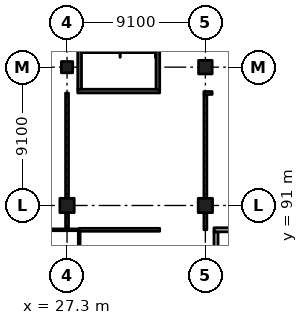
"""IFC4 building model, lengths in metres.
Left out: names, types, materials, properties, quantities, classifications, styles, units other than length and angle.
Written with IfcOpenShell. Run it as: python <this file> out.ifc"""

import sys

from ifc_helpers import new_model, si_unit, direction, frame, frame_2d, origin, origin_2d, place, context, subcontext, project, spatial, rectangle, extrude, element, fill, save


model = new_model("IFC4")
c1 = context("Model", 3, precision=1e-05, world=origin(), true_north=direction((0.0, 1.0)))
c2 = subcontext(c1, "Body", "Model", "MODEL_VIEW")
j1 = project(units=[si_unit("LENGTHUNIT", "METRE"), si_unit("PLANEANGLEUNIT", "RADIAN")], contexts=[c1])
p1 = place(None, origin())
s1 = spatial("IfcSite", under=j1, at=p1, CompositionType="ELEMENT")
p2 = place(p1, origin())
s2 = spatial("IfcBuilding", under=s1, at=p2, CompositionType="ELEMENT")
p3 = place(p2, origin())
s3 = spatial("IfcBuildingStorey", under=s2, at=p3, CompositionType="ELEMENT", Elevation=0.0)
p4 = place(p3, frame((27.3, 91.0, -0.4), z_axis=(0.0, 0.0, 1.0), x_axis=(1.0, 0.0, 0.0)))
e1 = element("IfcColumn", 1, at=p4, inside=s3, PredefinedType="COLUMN", context=c2, shape_type="SweptSolid", body=[
    extrude(rectangle(XDim=0.95, YDim=0.95, at=origin_2d()), origin(), (0.0, 0.0, 1.0), 6.77),
])
p5 = place(p3, frame((27.3, 100.1, -0.4), z_axis=(0.0, 0.0, 1.0), x_axis=(1.0, 0.0, 0.0)))
e2 = element("IfcColumn", 2, at=p5, inside=s3, PredefinedType="COLUMN", context=c2, shape_type="SweptSolid", body=[
    extrude(rectangle(XDim=0.75, YDim=0.75, at=origin_2d()), origin(), (0.0, 0.0, 1.0), 6.77),
])
p6 = place(p3, frame((36.4, 91.0, -0.4), z_axis=(0.0, 0.0, 1.0), x_axis=(1.0, 0.0, 0.0)))
e3 = element("IfcColumn", 3, at=p6, inside=s3, PredefinedType="COLUMN", context=c2, shape_type="SweptSolid", body=[
    extrude(rectangle(XDim=0.95, YDim=0.95, at=origin_2d()), origin(), (0.0, 0.0, 1.0), 6.77),
])
p7 = place(p3, frame((36.4, 100.1, -0.4), z_axis=(0.0, 0.0, 1.0), x_axis=(1.0, 0.0, 0.0)))
e4 = element("IfcColumn", 4, at=p7, inside=s3, PredefinedType="COLUMN", context=c2, shape_type="SweptSolid", body=[
    extrude(rectangle(XDim=0.9, YDim=0.9, at=origin_2d()), origin(), (0.0, 0.0, 1.0), 6.77),
])
p8 = place(p3, frame((33.4, 98.525, -0.4), z_axis=(0.0, 0.0, 1.0), x_axis=(-1.0, 0.0, 0.0)))
e5 = element("IfcWall", 5, at=p8, inside=s3, PredefinedType="SHEAR", context=c2, shape_type="SweptSolid", body=[
    extrude(rectangle(XDim=5.4, YDim=0.25, at=frame_2d((2.7, 0.0))), origin(), (0.0, 0.0, 1.0), 6.77),
])
p9 = place(p8, frame((1.5, 0.0, 0.4)))
e6 = element("IfcOpeningElement", 6, at=p9, cuts=e5, PredefinedType="OPENING", context=c2, shape_type="SweptSolid", body=[
    extrude(rectangle(XDim=2.4, YDim=2.1, at=frame_2d((1.2, 1.05))), frame((0.0, 0.135, 0.0), z_axis=(0.0, -1.0, 0.0), x_axis=(1.0, 0.0, 0.0)), (0.0, 0.0, 1.0), 0.27),
])
p10 = place(p3, frame((28.125, 108.25, -0.4), z_axis=(0.0, 0.0, 1.0), x_axis=(0.0, -1.0, 0.0)))
e7 = element("IfcWall", 7, at=p10, inside=s3, PredefinedType="SHEAR", context=c2, shape_type="SweptSolid", body=[
    extrude(rectangle(XDim=9.6, YDim=0.25, at=frame_2d((4.8, 0.0))), origin(), (0.0, 0.0, 1.0), 6.77),
])
p11 = place(p3, frame((33.275, 108.25, -0.4), z_axis=(0.0, 0.0, 1.0), x_axis=(0.0, -1.0, 0.0)))
e8 = element("IfcWall", 8, at=p11, inside=s3, PredefinedType="SHEAR", context=c2, shape_type="SweptSolid", body=[
    extrude(rectangle(XDim=9.6, YDim=0.25, at=frame_2d((4.8, 0.0))), origin(), (0.0, 0.0, 1.0), 6.77),
])
p12 = place(p11, frame((7.95, 0.0, 0.4)))
e9 = element("IfcOpeningElement", 9, at=p12, cuts=e8, PredefinedType="OPENING", context=c2, shape_type="SweptSolid", body=[
    extrude(rectangle(XDim=1.2, YDim=2.1, at=frame_2d((0.6, 1.05))), frame((0.0, 0.135, 0.0), z_axis=(0.0, -1.0, 0.0), x_axis=(1.0, 0.0, 0.0)), (0.0, 0.0, 1.0), 0.27),
])
p13 = place(p3, frame((24.3, 89.4, 0.0), z_axis=(0.0, 0.0, 1.0), x_axis=(1.0, 0.0, 0.0)))
e10 = element("IfcWall", 10, at=p13, inside=s3, PredefinedType="PARTITIONING", context=c2, shape_type="SweptSolid", body=[
    extrude(rectangle(XDim=3.8, YDim=0.125, at=frame_2d((1.9, 0.0))), origin(), (0.0, 0.0, 1.0), 6.02),
])
p14 = place(p13, frame((1.05, 0.0, 0.0)))
e11 = element("IfcOpeningElement", 11, at=p14, cuts=e10, PredefinedType="OPENING", context=c2, shape_type="SweptSolid", body=[
    extrude(rectangle(XDim=0.9, YDim=2.1, at=frame_2d((0.45, 1.05))), frame((0.0, 0.073, 0.0), z_axis=(0.0, -1.0, 0.0), x_axis=(1.0, 0.0, 0.0)), (0.0, 0.0, 1.0), 0.145),
])
p15 = place(p3, frame((27.3, 90.525, 0.0), z_axis=(0.0, 0.0, 1.0), x_axis=(0.0, -1.0, 0.0)))
e12 = element("IfcWall", 12, at=p15, inside=s3, PredefinedType="PARTITIONING", context=c2, shape_type="SweptSolid", body=[
    extrude(rectangle(XDim=1.062, YDim=0.2, at=frame_2d((0.531, 0.0))), origin(), (0.0, 0.0, 1.0), 5.32),
])
p16 = place(p3, frame((27.3, 98.4, 0.0), z_axis=(0.0, 0.0, 1.0), x_axis=(0.0, -1.0, 0.0)))
e13 = element("IfcWall", 13, at=p16, inside=s3, PredefinedType="PARTITIONING", context=c2, shape_type="SweptSolid", body=[
    extrude(rectangle(XDim=6.925, YDim=0.2, at=frame_2d((3.462, 0.0))), origin(), (0.0, 0.0, 1.0), 5.32),
])
p17 = place(p16, frame((0.85, 0.0, 0.0)))
e14 = element("IfcOpeningElement", 14, at=p17, cuts=e13, PredefinedType="OPENING", context=c2, shape_type="SweptSolid", body=[
    extrude(rectangle(XDim=1.8, YDim=2.4, at=frame_2d((0.9, 1.2))), frame((0.0, 0.11, 0.0), z_axis=(0.0, -1.0, 0.0), x_axis=(1.0, 0.0, 0.0)), (0.0, 0.0, 1.0), 0.22),
])
p18 = place(p16, frame((4.25, 0.0, 0.0)))
e15 = element("IfcOpeningElement", 15, at=p18, cuts=e13, PredefinedType="OPENING", context=c2, shape_type="SweptSolid", body=[
    extrude(rectangle(XDim=1.8, YDim=2.4, at=frame_2d((0.9, 1.2))), frame((0.0, 0.11, 0.0), z_axis=(0.0, -1.0, 0.0), x_axis=(1.0, 0.0, 0.0)), (0.0, 0.0, 1.0), 0.22),
])
p19 = place(p3, frame((28.1, 89.3, 0.0), z_axis=(0.0, 0.0, 1.0), x_axis=(0.0, -1.0, 0.0)))
e16 = element("IfcWall", 16, at=p19, inside=s3, PredefinedType="PARTITIONING", context=c2, shape_type="SweptSolid", body=[
    extrude(rectangle(XDim=2.87, YDim=0.125, at=frame_2d((1.435, 0.0))), origin(), (0.0, 0.0, 1.0), 6.02),
])
p20 = place(p3, frame((33.4, 89.4, 0.0), z_axis=(0.0, 0.0, 1.0), x_axis=(-1.0, 0.0, 0.0)))
e17 = element("IfcWall", 17, at=p20, inside=s3, PredefinedType="PARTITIONING", context=c2, shape_type="SweptSolid", body=[
    extrude(rectangle(XDim=5.3, YDim=0.2, at=frame_2d((2.65, 0.0))), origin(), (0.0, 0.0, 1.0), 6.02),
])
p21 = place(p20, frame((1.75, 0.0, 0.0)))
e18 = element("IfcOpeningElement", 18, at=p21, cuts=e17, PredefinedType="OPENING", context=c2, shape_type="SweptSolid", body=[
    extrude(rectangle(XDim=1.8, YDim=2.4, at=frame_2d((0.9, 1.2))), frame((0.0, 0.11, 0.0), z_axis=(0.0, -1.0, 0.0), x_axis=(1.0, 0.0, 0.0)), (0.0, 0.0, 1.0), 0.22),
])
p22 = place(p3, frame((36.4, 90.525, 0.0), z_axis=(0.0, 0.0, 1.0), x_axis=(0.0, -1.0, 0.0)))
e19 = element("IfcWall", 19, at=p22, inside=s3, PredefinedType="PARTITIONING", context=c2, shape_type="SweptSolid", body=[
    extrude(rectangle(XDim=1.125, YDim=0.2, at=frame_2d((0.562, 0.0))), origin(), (0.0, 0.0, 1.0), 5.32),
])
p23 = place(p3, frame((36.4, 98.3, 0.0), z_axis=(0.0, 0.0, 1.0), x_axis=(0.0, -1.0, 0.0)))
e20 = element("IfcWall", 20, at=p23, inside=s3, PredefinedType="PARTITIONING", context=c2, shape_type="SweptSolid", body=[
    extrude(rectangle(XDim=6.825, YDim=0.2, at=frame_2d((3.413, 0.0))), origin(), (0.0, 0.0, 1.0), 5.32),
])
p24 = place(p23, frame((0.85, 0.0, 0.0)))
e21 = element("IfcOpeningElement", 21, at=p24, cuts=e20, PredefinedType="OPENING", context=c2, shape_type="SweptSolid", body=[
    extrude(rectangle(XDim=1.8, YDim=2.4, at=frame_2d((0.9, 1.2))), frame((0.0, 0.11, 0.0), z_axis=(0.0, -1.0, 0.0), x_axis=(1.0, 0.0, 0.0)), (0.0, 0.0, 1.0), 0.22),
])
p25 = place(p23, frame((4.25, 0.0, 0.0)))
e22 = element("IfcOpeningElement", 22, at=p25, cuts=e20, PredefinedType="OPENING", context=c2, shape_type="SweptSolid", body=[
    extrude(rectangle(XDim=1.8, YDim=2.4, at=frame_2d((0.9, 1.2))), frame((0.0, 0.11, 0.0), z_axis=(0.0, -1.0, 0.0), x_axis=(1.0, 0.0, 0.0)), (0.0, 0.0, 1.0), 0.22),
])
p26 = place(p3, frame((36.85, 98.4, 0.0), z_axis=(0.0, 0.0, 1.0), x_axis=(-1.0, 0.0, 0.0)))
e23 = element("IfcWall", 23, at=p26, inside=s3, PredefinedType="PARTITIONING", context=c2, shape_type="SweptSolid", body=[
    extrude(rectangle(XDim=0.55, YDim=0.2, at=frame_2d((0.275, 0.0))), origin(), (0.0, 0.0, 1.0), 6.02),
])
p27 = place(p3, frame((37.1, 89.262, 0.0), z_axis=(0.0, 0.0, 1.0), x_axis=(0.0, -1.0, 0.0)))
e24 = element("IfcWall", 24, at=p27, inside=s3, PredefinedType="SOLIDWALL", context=c2, shape_type="SweptSolid", body=[
    extrude(rectangle(XDim=6.938, YDim=0.275, at=frame_2d((3.469, 0.0))), origin(), (0.0, 0.0, 1.0), 6.02),
])
p28 = place(p3, frame((40.55, 89.4, 0.0), z_axis=(0.0, 0.0, 1.0), x_axis=(-1.0, 0.0, 0.0)))
e25 = element("IfcWall", 25, at=p28, inside=s3, PredefinedType="SOLIDWALL", context=c2, shape_type="SweptSolid", body=[
    extrude(rectangle(XDim=3.588, YDim=0.275, at=frame_2d((1.794, 0.0))), origin(), (0.0, 0.0, 1.0), 6.02),
])
p29 = place(p28, frame((1.15, 0.0, 0.0)))
e26 = element("IfcOpeningElement", 26, at=p29, cuts=e25, PredefinedType="OPENING", context=c2, shape_type="SweptSolid", body=[
    extrude(rectangle(XDim=1.2, YDim=2.4, at=frame_2d((0.6, 1.2))), frame((0.0, 0.147, 0.0), z_axis=(0.0, -1.0, 0.0), x_axis=(1.0, 0.0, 0.0)), (0.0, 0.0, 1.0), 0.295),
])
p30 = place(p17, origin())
e27 = element("IfcDoor", 27, at=p30, inside=s3, OperationType="DOUBLE_DOOR_SINGLE_SWING", PredefinedType="DOOR", context=c2, shape_type="SweptSolid", body=[
    extrude(rectangle(XDim=1.8, YDim=2.4, at=frame_2d((0.9, 1.2))), frame((0.0, 0.025, 0.0), z_axis=(0.0, -1.0, 0.0), x_axis=(1.0, 0.0, 0.0)), (0.0, 0.0, 1.0), 0.05),
])
fill(e14, e27)
p31 = place(p18, origin())
e28 = element("IfcDoor", 28, at=p31, inside=s3, OperationType="DOUBLE_DOOR_SINGLE_SWING", PredefinedType="DOOR", context=c2, shape_type="SweptSolid", body=[
    extrude(rectangle(XDim=1.8, YDim=2.4, at=frame_2d((0.9, 1.2))), frame((0.0, 0.025, 0.0), z_axis=(0.0, -1.0, 0.0), x_axis=(1.0, 0.0, 0.0)), (0.0, 0.0, 1.0), 0.05),
])
fill(e15, e28)
p32 = place(p24, origin())
e29 = element("IfcDoor", 29, at=p32, inside=s3, OperationType="DOUBLE_DOOR_SINGLE_SWING", PredefinedType="DOOR", context=c2, shape_type="SweptSolid", body=[
    extrude(rectangle(XDim=1.8, YDim=2.4, at=frame_2d((0.9, 1.2))), frame((0.0, 0.025, 0.0), z_axis=(0.0, -1.0, 0.0), x_axis=(1.0, 0.0, 0.0)), (0.0, 0.0, 1.0), 0.05),
])
fill(e21, e29)
p33 = place(p25, origin())
e30 = element("IfcDoor", 30, at=p33, inside=s3, OperationType="DOUBLE_DOOR_SINGLE_SWING", PredefinedType="DOOR", context=c2, shape_type="SweptSolid", body=[
    extrude(rectangle(XDim=1.8, YDim=2.4, at=frame_2d((0.9, 1.2))), frame((0.0, 0.025, 0.0), z_axis=(0.0, -1.0, 0.0), x_axis=(1.0, 0.0, 0.0)), (0.0, 0.0, 1.0), 0.05),
])
fill(e22, e30)
p34 = place(p21, origin())
e31 = element("IfcDoor", 31, at=p34, inside=s3, OperationType="DOUBLE_DOOR_SINGLE_SWING", PredefinedType="DOOR", context=c2, shape_type="SweptSolid", body=[
    extrude(rectangle(XDim=1.8, YDim=2.4, at=frame_2d((0.9, 1.2))), frame((0.0, 0.025, 0.0), z_axis=(0.0, -1.0, 0.0), x_axis=(1.0, 0.0, 0.0)), (0.0, 0.0, 1.0), 0.05),
])
fill(e18, e31)
p35 = place(p9, origin())
e32 = element("IfcDoor", 32, at=p35, inside=s3, OperationType="DOUBLE_DOOR_SINGLE_SWING", PredefinedType="DOOR", context=c2, shape_type="SweptSolid", body=[
    extrude(rectangle(XDim=2.4, YDim=2.1, at=frame_2d((1.2, 1.05))), frame((0.0, 0.025, 0.0), z_axis=(0.0, -1.0, 0.0), x_axis=(1.0, 0.0, 0.0)), (0.0, 0.0, 1.0), 0.05),
])
fill(e6, e32)
p36 = place(p12, origin())
e33 = element("IfcDoor", 33, at=p36, inside=s3, OperationType="SINGLE_SWING_LEFT", PredefinedType="DOOR", context=c2, shape_type="SweptSolid", body=[
    extrude(rectangle(XDim=1.2, YDim=2.1, at=frame_2d((0.6, 1.05))), frame((0.0, 0.025, 0.0), z_axis=(0.0, -1.0, 0.0), x_axis=(1.0, 0.0, 0.0)), (0.0, 0.0, 1.0), 0.05),
])
fill(e9, e33)
save(model, sys.argv[1])
